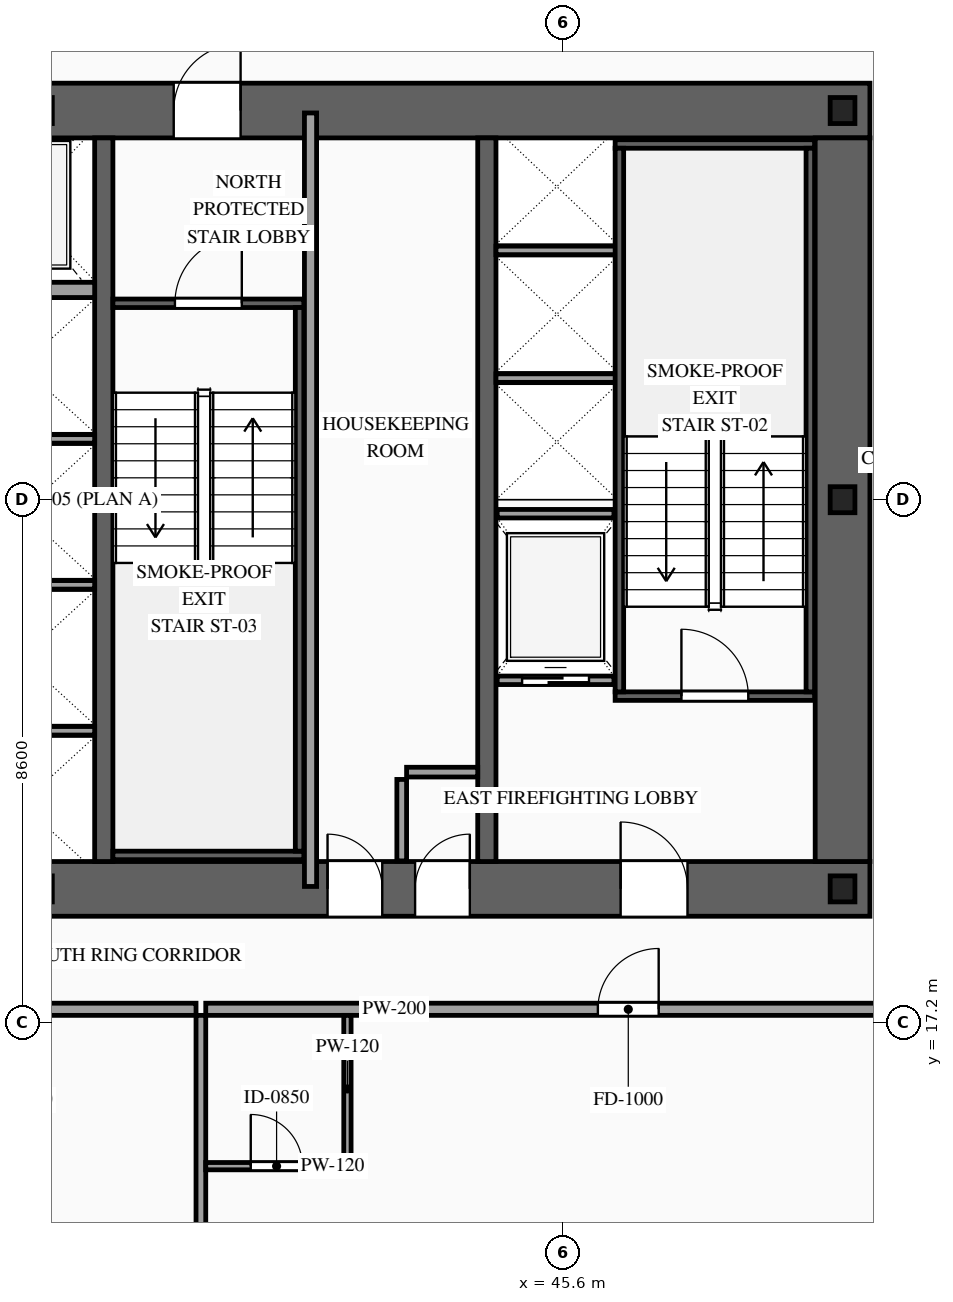
"""IFC4 building model, lengths in metres.
Left out: names, types, materials, properties, quantities, classifications, styles, units other than length and angle.
Written with IfcOpenShell. Run it as: python <this file> out.ifc"""

import sys

from ifc_helpers import new_model, si_unit, direction, frame, frame_2d, origin, origin_2d, place, context, subcontext, project, spatial, rectangle, i_section, extrude, source, transform, mapped, element, fill, save


model = new_model("IFC4")
c1 = context("Model", 3, precision=1e-05, world=origin(), true_north=direction((0.0, 1.0)))
c2 = subcontext(c1, "Body", "Model", "MODEL_VIEW")
j1 = project(units=[si_unit("LENGTHUNIT", "METRE"), si_unit("PLANEANGLEUNIT", "RADIAN")], contexts=[c1])
p1 = place(None, origin())
s1 = spatial("IfcSite", under=j1, at=p1, CompositionType="ELEMENT")
p2 = place(p1, origin())
s2 = spatial("IfcBuilding", under=s1, at=p2, CompositionType="ELEMENT")
p3 = place(p2, frame((0.0, 0.0, 78.4)))
s3 = spatial("IfcBuildingStorey", under=s2, at=p3, CompositionType="ELEMENT", Elevation=78.4)
p4 = place(p3, frame((23.35, 19.4, 0.0), z_axis=(0.0, 0.0, 1.0), x_axis=(1.0, 0.0, 0.0)))
e1 = element("IfcWall", 1, at=p4, inside=s3, PredefinedType="SHEAR", context=c2, shape_type="SweptSolid", body=[
    extrude(rectangle(XDim=27.3, YDim=0.9, at=frame_2d((13.65, 0.0))), origin(), (0.0, 0.0, 1.0), 3.6),
])
p5 = place(p4, frame((2.1, 0.0, 0.0)))
e2 = element("IfcOpeningElement", 2, at=p5, cuts=e1, PredefinedType="OPENING", context=c2, shape_type="SweptSolid", body=[
    extrude(rectangle(XDim=1.1, YDim=2.2, at=frame_2d((0.55, 1.1))), frame((0.0, 0.465, 0.0), z_axis=(0.0, -1.0, 0.0), x_axis=(1.0, 0.0, 0.0)), (0.0, 0.0, 1.0), 0.93),
])
p6 = place(p4, frame((10.0, 0.0, 0.0)))
e3 = element("IfcOpeningElement", 3, at=p6, cuts=e1, PredefinedType="OPENING", context=c2, shape_type="SweptSolid", body=[
    extrude(rectangle(XDim=1.1, YDim=2.2, at=frame_2d((0.55, 1.1))), frame((0.0, 0.465, 0.0), z_axis=(0.0, -1.0, 0.0), x_axis=(1.0, 0.0, 0.0)), (0.0, 0.0, 1.0), 0.93),
])
p7 = place(p4, frame((23.2, 0.0, 0.0)))
e4 = element("IfcOpeningElement", 4, at=p7, cuts=e1, PredefinedType="OPENING", context=c2, shape_type="SweptSolid", body=[
    extrude(rectangle(XDim=1.1, YDim=2.2, at=frame_2d((0.55, 1.1))), frame((0.0, 0.465, 0.0), z_axis=(0.0, -1.0, 0.0), x_axis=(1.0, 0.0, 0.0)), (0.0, 0.0, 1.0), 0.93),
])
p8 = place(p4, frame((19.82, 0.0, 0.0)))
e5 = element("IfcOpeningElement", 5, at=p8, cuts=e1, PredefinedType="OPENING", context=c2, shape_type="SweptSolid", body=[
    extrude(rectangle(XDim=0.9, YDim=2.15, at=frame_2d((0.45, 1.075))), frame((0.0, 0.465, 0.0), z_axis=(0.0, -1.0, 0.0), x_axis=(1.0, 0.0, 0.0)), (0.0, 0.0, 1.0), 0.93),
])
p9 = place(p4, frame((18.38, 0.0, 0.0)))
e6 = element("IfcOpeningElement", 6, at=p9, cuts=e1, PredefinedType="OPENING", context=c2, shape_type="SweptSolid", body=[
    extrude(rectangle(XDim=0.9, YDim=2.15, at=frame_2d((0.45, 1.075))), frame((0.0, 0.465, 0.0), z_axis=(0.0, -1.0, 0.0), x_axis=(1.0, 0.0, 0.0)), (0.0, 0.0, 1.0), 0.93),
])
p10 = place(p3, frame((23.35, 32.2, 0.0), z_axis=(0.0, 0.0, 1.0), x_axis=(1.0, 0.0, 0.0)))
e7 = element("IfcWall", 7, at=p10, inside=s3, PredefinedType="SHEAR", context=c2, shape_type="SweptSolid", body=[
    extrude(rectangle(XDim=27.3, YDim=0.9, at=frame_2d((13.65, 0.0))), origin(), (0.0, 0.0, 1.0), 3.6),
])
p11 = place(p10, frame((4.72, 0.0, 0.0)))
e8 = element("IfcOpeningElement", 8, at=p11, cuts=e7, PredefinedType="OPENING", context=c2, shape_type="SweptSolid", body=[
    extrude(rectangle(XDim=0.9, YDim=2.15, at=frame_2d((0.45, 1.075))), frame((0.0, 0.465, 0.0), z_axis=(0.0, -1.0, 0.0), x_axis=(1.0, 0.0, 0.0)), (0.0, 0.0, 1.0), 0.93),
])
p12 = place(p10, frame((10.0, 0.0, 0.0)))
e9 = element("IfcOpeningElement", 9, at=p12, cuts=e7, PredefinedType="OPENING", context=c2, shape_type="SweptSolid", body=[
    extrude(rectangle(XDim=1.1, YDim=2.2, at=frame_2d((0.55, 1.1))), frame((0.0, 0.465, 0.0), z_axis=(0.0, -1.0, 0.0), x_axis=(1.0, 0.0, 0.0)), (0.0, 0.0, 1.0), 0.93),
])
p13 = place(p10, frame((15.85, 0.0, 0.0)))
e10 = element("IfcOpeningElement", 10, at=p13, cuts=e7, PredefinedType="OPENING", context=c2, shape_type="SweptSolid", body=[
    extrude(rectangle(XDim=1.1, YDim=2.2, at=frame_2d((0.55, 1.1))), frame((0.0, 0.465, 0.0), z_axis=(0.0, -1.0, 0.0), x_axis=(1.0, 0.0, 0.0)), (0.0, 0.0, 1.0), 0.93),
])
m1 = source(origin(), c2, "Body", "SweptSolid", [
    extrude(rectangle(XDim=11.9, YDim=0.9, at=frame_2d((5.95, 0.0))), origin(), (0.0, 0.0, 1.0), 3.6),
])
p14 = place(p3, frame((50.2, 19.85, 0.0), z_axis=(0.0, 0.0, 1.0), x_axis=(0.0, 1.0, 0.0)))
e11 = element("IfcWall", 11, at=p14, inside=s3, PredefinedType="SHEAR", context=c2, shape_type="MappedRepresentation", body=[
    mapped(m1, transform((0.0, 0.0, 0.0), scale=1.0)),
])
m2 = source(origin(), c2, "Body", "SweptSolid", [
    extrude(rectangle(XDim=11.9, YDim=0.3, at=frame_2d((5.95, 0.0))), origin(), (0.0, 0.0, 1.0), 3.6),
])
for number, where, z_axis, x_axis in (
    (12, (38.05, 19.85, 0.0), (0.0, 0.0, 1.0), (0.0, 1.0, 0.0)),
    (13, (44.35, 19.85, 0.0), (0.0, 0.0, 1.0), (0.0, 1.0, 0.0)),
):
    element("IfcWall", number, at=place(p3, frame(where, z_axis=z_axis, x_axis=x_axis)), inside=s3, PredefinedType="SOLIDWALL", context=c2, shape_type="MappedRepresentation", body=[
        mapped(m2, transform((0.0, 0.0, 0.0), scale=1.0)),
    ])
m3 = source(origin(), c2, "Body", "SweptSolid", [
    extrude(i_section(OverallWidth=0.407, OverallDepth=0.428, WebThickness=0.02, FlangeThickness=0.035, at=origin_2d()), origin(), (0.0, 0.0, 1.0), 3.6),
])
for number, where, z_axis, x_axis in (
    (14, (37.0, 19.4, 0.0), (0.0, 0.0, 1.0), (1.0, 0.0, 0.0)),
    (15, (50.2, 19.4, 0.0), (0.0, 0.0, 1.0), (1.0, 0.0, 0.0)),
    (16, (50.2, 25.8, 0.0), (0.0, 0.0, 1.0), (1.0, 0.0, 0.0)),
    (17, (37.0, 32.2, 0.0), (0.0, 0.0, 1.0), (1.0, 0.0, 0.0)),
    (18, (50.2, 32.2, 0.0), (0.0, 0.0, 1.0), (1.0, 0.0, 0.0)),
):
    element("IfcColumn", number, at=place(p3, frame(where, z_axis=z_axis, x_axis=x_axis)), inside=s3, PredefinedType="COLUMN", context=c2, shape_type="MappedRepresentation", body=[
        mapped(m3, transform((0.0, 0.0, 0.0), scale=1.0)),
    ])
p15 = place(p3, frame((44.52, 22.83, 0.0), z_axis=(0.0, 0.0, 1.0), x_axis=(1.0, 0.0, 0.0)))
e19 = element("IfcWall", 19, at=p15, inside=s3, PredefinedType="SOLIDWALL", context=c2, shape_type="SweptSolid", body=[
    extrude(rectangle(XDim=1.92, YDim=0.14, at=frame_2d((0.96, 0.0))), origin(), (0.0, 0.0, 1.0), 3.38),
])
p16 = place(p15, frame((0.41, 0.0, 0.0)))
e20 = element("IfcOpeningElement", 20, at=p16, cuts=e19, PredefinedType="OPENING", context=c2, shape_type="SweptSolid", body=[
    extrude(rectangle(XDim=1.1, YDim=2.2, at=frame_2d((0.55, 1.1))), frame((0.0, 0.085, 0.0), z_axis=(0.0, -1.0, 0.0), x_axis=(1.0, 0.0, 0.0)), (0.0, 0.0, 1.0), 0.17),
])
m4 = source(origin(), c2, "Body", "SweptSolid", [
    extrude(rectangle(XDim=1.92, YDim=0.14, at=frame_2d((0.96, 0.0))), origin(), (0.0, 0.0, 1.0), 3.38),
])
p17 = place(p3, frame((44.52, 25.57, 0.0), z_axis=(0.0, 0.0, 1.0), x_axis=(1.0, 0.0, 0.0)))
e21 = element("IfcWall", 21, at=p17, inside=s3, PredefinedType="SOLIDWALL", context=c2, shape_type="MappedRepresentation", body=[
    mapped(m4, transform((0.0, 0.0, 0.0), scale=1.0)),
])
m5 = source(origin(), c2, "Body", "SweptSolid", [
    extrude(rectangle(XDim=2.4, YDim=0.14, at=frame_2d((1.2, 0.0))), origin(), (0.0, 0.0, 1.0), 3.38),
])
for number, where, z_axis, x_axis in (
    (22, (35.5, 22.0, 0.0), (0.0, 0.0, 1.0), (1.0, 0.0, 0.0)),
    (23, (35.5, 24.4, 0.0), (0.0, 0.0, 1.0), (1.0, 0.0, 0.0)),
    (24, (35.5, 26.8, 0.0), (0.0, 0.0, 1.0), (1.0, 0.0, 0.0)),
):
    element("IfcWall", number, at=place(p3, frame(where, z_axis=z_axis, x_axis=x_axis)), inside=s3, PredefinedType="SOLIDWALL", context=c2, shape_type="MappedRepresentation", body=[
        mapped(m5, transform((0.0, 0.0, 0.0), scale=1.0)),
    ])
m6 = source(origin(), c2, "Body", "SweptSolid", [
    extrude(rectangle(XDim=2.4, YDim=0.25, at=frame_2d((1.2, 0.0))), origin(), (0.0, 0.0, 1.0), 3.38),
])
p18 = place(p3, frame((35.5, 29.25, 0.0), z_axis=(0.0, 0.0, 1.0), x_axis=(1.0, 0.0, 0.0)))
e25 = element("IfcWall", 25, at=p18, inside=s3, PredefinedType="SOLIDWALL", context=c2, shape_type="MappedRepresentation", body=[
    mapped(m6, transform((0.0, 0.0, 0.0), scale=1.0)),
])
m7 = source(origin(), c2, "Body", "SweptSolid", [
    extrude(rectangle(XDim=2.0, YDim=0.14, at=frame_2d((1.0, 0.0))), origin(), (0.0, 0.0, 1.0), 3.38),
])
for number, where, z_axis, x_axis in (
    (26, (44.5, 27.8, 0.0), (0.0, 0.0, 1.0), (1.0, 0.0, 0.0)),
    (27, (44.5, 29.9, 0.0), (0.0, 0.0, 1.0), (1.0, 0.0, 0.0)),
):
    element("IfcWall", number, at=place(p3, frame(where, z_axis=z_axis, x_axis=x_axis)), inside=s3, PredefinedType="SOLIDWALL", context=c2, shape_type="MappedRepresentation", body=[
        mapped(m7, transform((0.0, 0.0, 0.0), scale=1.0)),
    ])
p19 = place(p3, frame((46.46, 22.57, 0.0), z_axis=(0.0, 0.0, 1.0), x_axis=(1.0, 0.0, 0.0)))
e28 = element("IfcWall", 28, at=p19, inside=s3, PredefinedType="SOLIDWALL", context=c2, shape_type="SweptSolid", body=[
    extrude(rectangle(XDim=3.28, YDim=0.14, at=frame_2d((1.64, 0.0))), origin(), (0.0, 0.0, 1.0), 3.38),
])
p20 = place(p19, frame((1.09, 0.0, 0.0)))
e29 = element("IfcOpeningElement", 29, at=p20, cuts=e28, PredefinedType="OPENING", context=c2, shape_type="SweptSolid", body=[
    extrude(rectangle(XDim=1.1, YDim=2.2, at=frame_2d((0.55, 1.1))), frame((0.0, 0.085, 0.0), z_axis=(0.0, -1.0, 0.0), x_axis=(1.0, 0.0, 0.0)), (0.0, 0.0, 1.0), 0.17),
])
m8 = source(origin(), c2, "Body", "SweptSolid", [
    extrude(rectangle(XDim=3.28, YDim=0.14, at=frame_2d((1.64, 0.0))), origin(), (0.0, 0.0, 1.0), 3.38),
])
p21 = place(p3, frame((46.46, 31.65, 0.0), z_axis=(0.0, 0.0, 1.0), x_axis=(1.0, 0.0, 0.0)))
e30 = element("IfcWall", 30, at=p21, inside=s3, PredefinedType="SOLIDWALL", context=c2, shape_type="MappedRepresentation", body=[
    mapped(m8, transform((0.0, 0.0, 0.0), scale=1.0)),
])
m9 = source(origin(), c2, "Body", "SweptSolid", [
    extrude(rectangle(XDim=8.94, YDim=0.14, at=frame_2d((4.47, 0.0))), origin(), (0.0, 0.0, 1.0), 3.38),
])
for number, where, z_axis, x_axis in (
    (31, (46.53, 22.64, 0.0), (0.0, 0.0, 1.0), (0.0, 1.0, 0.0)),
    (32, (49.67, 22.64, 0.0), (0.0, 0.0, 1.0), (0.0, 1.0, 0.0)),
):
    element("IfcWall", number, at=place(p3, frame(where, z_axis=z_axis, x_axis=x_axis)), inside=s3, PredefinedType="SOLIDWALL", context=c2, shape_type="MappedRepresentation", body=[
        mapped(m9, transform((0.0, 0.0, 0.0), scale=1.0)),
    ])
p22 = place(p3, frame((38.2, 29.03, 0.0), z_axis=(0.0, 0.0, 1.0), x_axis=(1.0, 0.0, 0.0)))
e33 = element("IfcWall", 33, at=p22, inside=s3, PredefinedType="SOLIDWALL", context=c2, shape_type="SweptSolid", body=[
    extrude(rectangle(XDim=3.14, YDim=0.14, at=frame_2d((1.57, 0.0))), origin(), (0.0, 0.0, 1.0), 3.38),
])
p23 = place(p22, frame((1.02, 0.0, 0.0)))
e34 = element("IfcOpeningElement", 34, at=p23, cuts=e33, PredefinedType="OPENING", context=c2, shape_type="SweptSolid", body=[
    extrude(rectangle(XDim=1.1, YDim=2.2, at=frame_2d((0.55, 1.1))), frame((0.0, 0.085, 0.0), z_axis=(0.0, -1.0, 0.0), x_axis=(1.0, 0.0, 0.0)), (0.0, 0.0, 1.0), 0.17),
])
m10 = source(origin(), c2, "Body", "SweptSolid", [
    extrude(rectangle(XDim=3.14, YDim=0.14, at=frame_2d((1.57, 0.0))), origin(), (0.0, 0.0, 1.0), 3.38),
])
p24 = place(p3, frame((38.2, 19.95, 0.0), z_axis=(0.0, 0.0, 1.0), x_axis=(1.0, 0.0, 0.0)))
e35 = element("IfcWall", 35, at=p24, inside=s3, PredefinedType="SOLIDWALL", context=c2, shape_type="MappedRepresentation", body=[
    mapped(m10, transform((0.0, 0.0, 0.0), scale=1.0)),
])
m11 = source(origin(), c2, "Body", "SweptSolid", [
    extrude(rectangle(XDim=8.94, YDim=0.14, at=frame_2d((4.47, 0.0))), origin(), (0.0, 0.0, 1.0), 3.38),
])
p25 = place(p3, frame((41.27, 20.02, 0.0), z_axis=(0.0, 0.0, 1.0), x_axis=(0.0, 1.0, 0.0)))
e36 = element("IfcWall", 36, at=p25, inside=s3, PredefinedType="SOLIDWALL", context=c2, shape_type="MappedRepresentation", body=[
    mapped(m11, transform((0.0, 0.0, 0.0), scale=1.0)),
])
m12 = source(origin(), c2, "Body", "SweptSolid", [
    extrude(rectangle(XDim=1.34, YDim=0.16, at=frame_2d((0.67, 0.0))), origin(), (0.0, 0.0, 1.0), 3.38),
])
p26 = place(p3, frame((42.95, 19.86, 0.0), z_axis=(0.0, 0.0, 1.0), x_axis=(0.0, 1.0, 0.0)))
e37 = element("IfcWall", 37, at=p26, inside=s3, PredefinedType="PARTITIONING", context=c2, shape_type="MappedRepresentation", body=[
    mapped(m12, transform((0.0, 0.0, 0.0), scale=1.0)),
])
m13 = source(origin(), c2, "Body", "SweptSolid", [
    extrude(rectangle(XDim=1.17, YDim=0.16, at=frame_2d((0.585, 0.0))), origin(), (0.0, 0.0, 1.0), 3.38),
])
p27 = place(p3, frame((43.03, 21.32, 0.0), z_axis=(0.0, 0.0, 1.0), x_axis=(1.0, 0.0, 0.0)))
e38 = element("IfcWall", 38, at=p27, inside=s3, PredefinedType="PARTITIONING", context=c2, shape_type="MappedRepresentation", body=[
    mapped(m13, transform((0.0, 0.0, 0.0), scale=1.0)),
])
m14 = source(origin(), c2, "Body", "SweptSolid", [
    extrude(rectangle(XDim=12.72, YDim=0.2, at=frame_2d((6.36, 0.0))), origin(), (0.0, 0.0, 1.0), 3.38),
])
p28 = place(p3, frame((41.45, 19.44, 0.0), z_axis=(0.0, 0.0, 1.0), x_axis=(0.0, 1.0, 0.0)))
e39 = element("IfcWall", 39, at=p28, inside=s3, PredefinedType="PARTITIONING", context=c2, shape_type="MappedRepresentation", body=[
    mapped(m14, transform((0.0, 0.0, 0.0), scale=1.0)),
])
p29 = place(p3, frame((33.727, 17.42, 0.0), z_axis=(0.0, 0.0, 1.0), x_axis=(1.0, 0.0, 0.0)))
e40 = element("IfcWall", 40, at=p29, inside=s3, PredefinedType="PARTITIONING", context=c2, shape_type="SweptSolid", body=[
    extrude(rectangle(XDim=5.84, YDim=0.2, at=frame_2d((2.92, 0.0))), origin(), (0.0, 0.0, 1.0), 3.38),
])
p30 = place(p29, frame((2.42, 0.0, 0.0)))
e41 = element("IfcOpeningElement", 41, at=p30, cuts=e40, PredefinedType="OPENING", context=c2, shape_type="SweptSolid", body=[
    extrude(rectangle(XDim=1.0, YDim=2.2, at=frame_2d((0.5, 1.1))), frame((0.0, 0.115, 0.0), z_axis=(0.0, -1.0, 0.0), x_axis=(1.0, 0.0, 0.0)), (0.0, 0.0, 1.0), 0.23),
])
m15 = source(origin(), c2, "Body", "SweptSolid", [
    extrude(rectangle(XDim=16.47, YDim=0.16, at=frame_2d((8.235, 0.0))), origin(), (0.0, 0.0, 1.0), 3.38),
])
p31 = place(p3, frame((39.647, 0.85, 0.0), z_axis=(0.0, 0.0, 1.0), x_axis=(0.0, 1.0, 0.0)))
e42 = element("IfcWall", 42, at=p31, inside=s3, PredefinedType="PARTITIONING", context=c2, shape_type="MappedRepresentation", body=[
    mapped(m15, transform((0.0, 0.0, 0.0), scale=1.0)),
])
p32 = place(p3, frame((39.727, 17.42, 0.0), z_axis=(0.0, 0.0, 1.0), x_axis=(1.0, 0.0, 0.0)))
e43 = element("IfcWall", 43, at=p32, inside=s3, PredefinedType="PARTITIONING", context=c2, shape_type="SweptSolid", body=[
    extrude(rectangle(XDim=11.488, YDim=0.2, at=frame_2d((5.744, 0.0))), origin(), (0.0, 0.0, 1.0), 3.38),
])
p33 = place(p32, frame((6.449, 0.0, 0.0)))
e44 = element("IfcOpeningElement", 44, at=p33, cuts=e43, PredefinedType="OPENING", context=c2, shape_type="SweptSolid", body=[
    extrude(rectangle(XDim=1.0, YDim=2.2, at=frame_2d((0.5, 1.1))), frame((0.0, 0.115, 0.0), z_axis=(0.0, -1.0, 0.0), x_axis=(1.0, 0.0, 0.0)), (0.0, 0.0, 1.0), 0.23),
])
p34 = place(p3, frame((39.727, 14.84, 0.0), z_axis=(0.0, 0.0, 1.0), x_axis=(1.0, 0.0, 0.0)))
e45 = element("IfcWall", 45, at=p34, inside=s3, PredefinedType="PARTITIONING", context=c2, shape_type="SweptSolid", body=[
    extrude(rectangle(XDim=2.33, YDim=0.12, at=frame_2d((1.165, 0.0))), origin(), (0.0, 0.0, 1.0), 3.38),
])
p35 = place(p34, frame((0.74, 0.0, 0.0)))
e46 = element("IfcOpeningElement", 46, at=p35, cuts=e45, PredefinedType="OPENING", context=c2, shape_type="SweptSolid", body=[
    extrude(rectangle(XDim=0.85, YDim=2.1, at=frame_2d((0.425, 1.05))), frame((0.0, 0.075, 0.0), z_axis=(0.0, -1.0, 0.0), x_axis=(1.0, 0.0, 0.0)), (0.0, 0.0, 1.0), 0.15),
])
m16 = source(origin(), c2, "Body", "SweptSolid", [
    extrude(rectangle(XDim=2.42, YDim=0.12, at=frame_2d((1.21, 0.0))), origin(), (0.0, 0.0, 1.0), 3.38),
])
p36 = place(p3, frame((42.057, 14.9, 0.0), z_axis=(0.0, 0.0, 1.0), x_axis=(0.0, 1.0, 0.0)))
e47 = element("IfcWall", 47, at=p36, inside=s3, PredefinedType="PARTITIONING", context=c2, shape_type="MappedRepresentation", body=[
    mapped(m16, transform((0.0, 0.0, 0.0), scale=1.0)),
])
m17 = source(origin(), c2, "Body", "SweptSolid", [
    extrude(rectangle(XDim=1.1, YDim=2.2, at=frame_2d((0.55, 1.1))), frame((0.0, 0.025, 0.0), z_axis=(0.0, -1.0, 0.0), x_axis=(1.0, 0.0, 0.0)), (0.0, 0.0, 1.0), 0.05),
])
p37 = place(p16, origin())
e48 = element("IfcDoor", 48, at=p37, inside=s3, OperationType="SLIDING_TO_RIGHT", PredefinedType="DOOR", context=c2, shape_type="MappedRepresentation", body=[
    mapped(m17, transform((0.0, 0.0, 0.0), scale=1.0)),
])
fill(e20, e48)
m18 = source(origin(), c2, "Body", "SweptSolid", [
    extrude(rectangle(XDim=1.1, YDim=2.2, at=frame_2d((0.55, 1.1))), frame((0.0, 0.025, 0.0), z_axis=(0.0, -1.0, 0.0), x_axis=(1.0, 0.0, 0.0)), (0.0, 0.0, 1.0), 0.05),
])
p38 = place(p20, origin())
e49 = element("IfcDoor", 49, at=p38, inside=s3, OperationType="SINGLE_SWING_LEFT", PredefinedType="DOOR", context=c2, shape_type="MappedRepresentation", body=[
    mapped(m18, transform((0.0, 0.0, 0.0), scale=1.0)),
])
fill(e29, e49)
p39 = place(p23, origin())
e50 = element("IfcDoor", 50, at=p39, inside=s3, OperationType="SINGLE_SWING_RIGHT", PredefinedType="DOOR", context=c2, shape_type="MappedRepresentation", body=[
    mapped(m18, transform((0.0, 0.0, 0.0), scale=1.0)),
])
fill(e34, e50)
p40 = place(p7, origin())
e51 = element("IfcDoor", 51, at=p40, inside=s3, OperationType="SINGLE_SWING_LEFT", PredefinedType="DOOR", context=c2, shape_type="MappedRepresentation", body=[
    mapped(m18, transform((0.0, 0.0, 0.0), scale=1.0)),
])
fill(e4, e51)
p41 = place(p13, origin())
e52 = element("IfcDoor", 52, at=p41, inside=s3, OperationType="SINGLE_SWING_RIGHT", PredefinedType="DOOR", context=c2, shape_type="MappedRepresentation", body=[
    mapped(m18, transform((0.0, 0.0, 0.0), scale=1.0)),
])
fill(e10, e52)
m19 = source(origin(), c2, "Body", "SweptSolid", [
    extrude(rectangle(XDim=0.9, YDim=2.15, at=frame_2d((0.45, 1.075))), frame((0.0, 0.025, 0.0), z_axis=(0.0, -1.0, 0.0), x_axis=(1.0, 0.0, 0.0)), (0.0, 0.0, 1.0), 0.05),
])
p42 = place(p8, origin())
e53 = element("IfcDoor", 53, at=p42, inside=s3, OperationType="SINGLE_SWING_RIGHT", PredefinedType="DOOR", context=c2, shape_type="MappedRepresentation", body=[
    mapped(m19, transform((0.0, 0.0, 0.0), scale=1.0)),
])
fill(e5, e53)
p43 = place(p9, origin())
e54 = element("IfcDoor", 54, at=p43, inside=s3, OperationType="SINGLE_SWING_LEFT", PredefinedType="DOOR", context=c2, shape_type="MappedRepresentation", body=[
    mapped(m19, transform((0.0, 0.0, 0.0), scale=1.0)),
])
fill(e6, e54)
m20 = source(origin(), c2, "Body", "SweptSolid", [
    extrude(rectangle(XDim=1.0, YDim=2.2, at=frame_2d((0.5, 1.1))), frame((0.0, 0.025, 0.0), z_axis=(0.0, -1.0, 0.0), x_axis=(1.0, 0.0, 0.0)), (0.0, 0.0, 1.0), 0.05),
])
p44 = place(p33, origin())
e55 = element("IfcDoor", 55, at=p44, inside=s3, OperationType="SINGLE_SWING_RIGHT", PredefinedType="DOOR", context=c2, shape_type="MappedRepresentation", body=[
    mapped(m20, transform((0.0, 0.0, 0.0), scale=1.0)),
])
fill(e44, e55)
m21 = source(origin(), c2, "Body", "SweptSolid", [
    extrude(rectangle(XDim=0.85, YDim=2.1, at=frame_2d((0.425, 1.05))), frame((0.0, 0.025, 0.0), z_axis=(0.0, -1.0, 0.0), x_axis=(1.0, 0.0, 0.0)), (0.0, 0.0, 1.0), 0.05),
])
p45 = place(p35, origin())
e56 = element("IfcDoor", 56, at=p45, inside=s3, OperationType="SINGLE_SWING_LEFT", PredefinedType="DOOR", context=c2, shape_type="MappedRepresentation", body=[
    mapped(m21, transform((0.0, 0.0, 0.0), scale=1.0)),
])
fill(e46, e56)
save(model, sys.argv[1])
